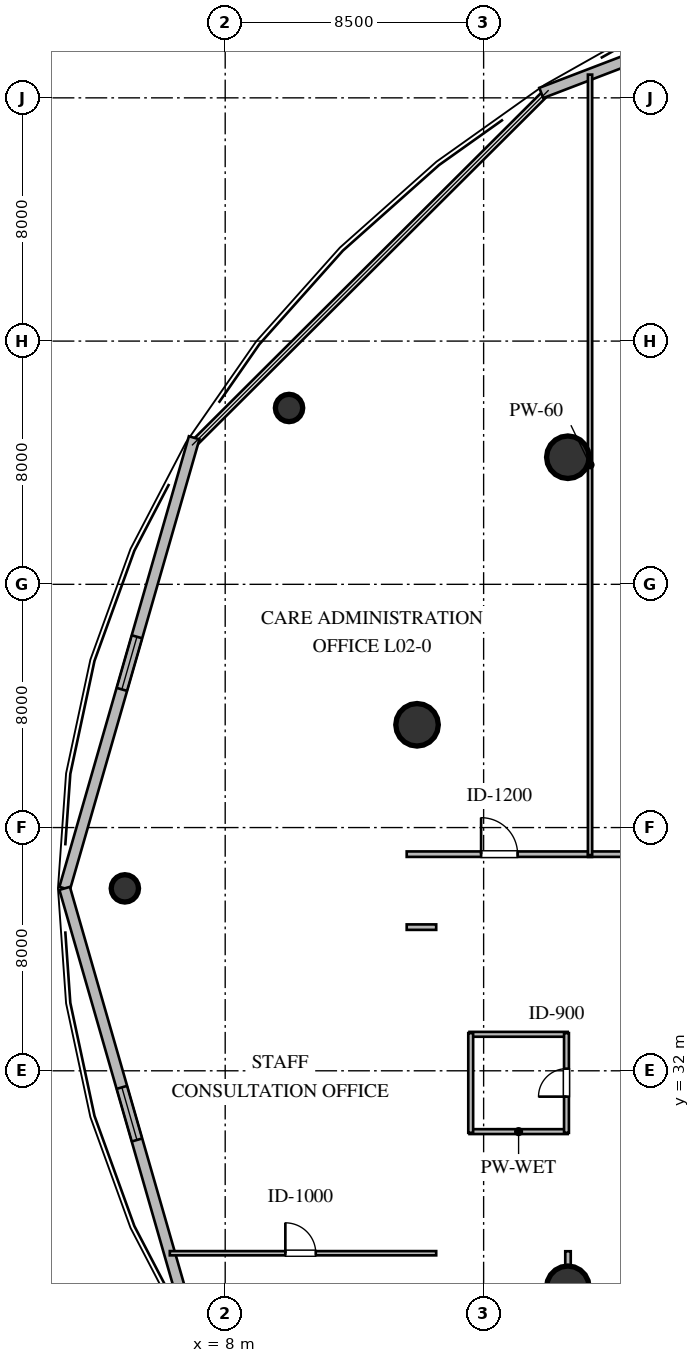
"""IFC4 building model, lengths in metres.
Left out: names, types, materials, properties, quantities, classifications, styles, units other than length and angle.
Written with IfcOpenShell. Run it as: python <this file> out.ifc"""

import sys

from ifc_helpers import new_model, si_unit, direction, frame, frame_2d, origin, origin_2d, place, context, subcontext, project, spatial, rectangle, circle, extrude, element, fill, save


model = new_model("IFC4")
c1 = context("Model", 3, precision=1e-05, world=origin(), true_north=direction((0.0, 1.0)))
c2 = subcontext(c1, "Body", "Model", "MODEL_VIEW")
j1 = project(units=[si_unit("LENGTHUNIT", "METRE"), si_unit("PLANEANGLEUNIT", "RADIAN")], contexts=[c1])
p1 = place(None, origin())
s1 = spatial("IfcSite", under=j1, at=p1, CompositionType="ELEMENT")
p2 = place(p1, origin())
s2 = spatial("IfcBuilding", under=s1, at=p2, CompositionType="ELEMENT")
p3 = place(p2, frame((0.0, 0.0, 9.6)))
s3 = spatial("IfcBuildingStorey", under=s2, at=p3, CompositionType="ELEMENT", Elevation=9.6)
for number, where, z_axis, x_axis in (
    (1, (19.27, 52.18, 0.0), (0.0, 0.0, 1.0), (1.0, 0.0, 0.0)),
    (2, (14.31, 43.38, 0.0), (0.0, 0.0, 1.0), (1.0, 0.0, 0.0)),
    (3, (19.27, 24.88, 0.0), (0.0, 0.0, 1.0), (1.0, 0.0, 0.0)),
):
    element("IfcColumn", number, at=place(p3, frame(where, z_axis=z_axis, x_axis=x_axis)), inside=s3, PredefinedType="COLUMN", context=c2, shape_type="SweptSolid", body=[
        extrude(circle(Radius=0.7, at=origin_2d()), origin(), (0.0, 0.0, 1.0), 4.8),
    ])
for number, where, z_axis, x_axis in (
    (4, (10.1, 53.8, 0.0), (0.0, 0.0, 1.0), (1.0, 0.0, 0.0)),
    (5, (4.7, 38.0, 0.0), (0.0, 0.0, 1.0), (1.0, 0.0, 0.0)),
):
    element("IfcColumn", number, at=place(p3, frame(where, z_axis=z_axis, x_axis=x_axis)), inside=s3, PredefinedType="COLUMN", context=c2, shape_type="SweptSolid", body=[
        extrude(circle(Radius=0.45, at=origin_2d()), origin(), (0.0, 0.0, 1.0), 4.8),
    ])
p4 = place(p3, frame((35.835, 70.831, 0.0), z_axis=(0.0, 0.0, 1.0), x_axis=(-0.934010262022, -0.357246176238, 0.0)))
e6 = element("IfcWall", 6, at=p4, inside=s3, PredefinedType="STANDARD", context=c2, shape_type="SweptSolid", body=[
    extrude(rectangle(XDim=18.671, YDim=0.36, at=frame_2d((9.335, 0.0))), origin(), (0.0, 0.0, 1.0), 4.52),
])
p5 = place(p4, frame((8.436, 0.0, 1.05)))
e7 = element("IfcOpeningElement", 7, at=p5, cuts=e6, PredefinedType="OPENING", context=c2, shape_type="SweptSolid", body=[
    extrude(rectangle(XDim=1.8, YDim=1.7, at=frame_2d((0.9, 0.85))), frame((0.0, 0.19, 0.0), z_axis=(0.0, -1.0, 0.0), x_axis=(1.0, 0.0, 0.0)), (0.0, 0.0, 1.0), 0.38),
])
p6 = place(p3, frame((6.979, 52.82, 0.0), z_axis=(0.0, 0.0, 1.0), x_axis=(-0.276203409751, -0.961099202186, 0.0)))
e8 = element("IfcWall", 8, at=p6, inside=s3, PredefinedType="STANDARD", context=c2, shape_type="SweptSolid", body=[
    extrude(rectangle(XDim=15.42, YDim=0.36, at=frame_2d((7.71, 0.0))), origin(), (0.0, 0.0, 1.0), 4.52),
])
p7 = place(p6, frame((6.81, 0.0, 1.05)))
e9 = element("IfcOpeningElement", 9, at=p7, cuts=e8, PredefinedType="OPENING", context=c2, shape_type="SweptSolid", body=[
    extrude(rectangle(XDim=1.8, YDim=1.7, at=frame_2d((0.9, 0.85))), frame((0.0, 0.19, 0.0), z_axis=(0.0, -1.0, 0.0), x_axis=(1.0, 0.0, 0.0)), (0.0, 0.0, 1.0), 0.38),
])
p8 = place(p3, frame((2.72, 38.0, 0.0), z_axis=(0.0, 0.0, 1.0), x_axis=(0.276203409751, -0.961099202186, 0.0)))
e10 = element("IfcWall", 10, at=p8, inside=s3, PredefinedType="STANDARD", context=c2, shape_type="SweptSolid", body=[
    extrude(rectangle(XDim=15.42, YDim=0.36, at=frame_2d((7.71, 0.0))), origin(), (0.0, 0.0, 1.0), 4.52),
])
p9 = place(p8, frame((6.81, 0.0, 1.05)))
e11 = element("IfcOpeningElement", 11, at=p9, cuts=e10, PredefinedType="OPENING", context=c2, shape_type="SweptSolid", body=[
    extrude(rectangle(XDim=1.8, YDim=1.7, at=frame_2d((0.9, 0.85))), frame((0.0, 0.19, 0.0), z_axis=(0.0, -1.0, 0.0), x_axis=(1.0, 0.0, 0.0)), (0.0, 0.0, 1.0), 0.38),
])
for number, where, z_axis, x_axis in (
    (12, (16.035, 30.0, 0.0), (0.0, 0.0, 1.0), (1.0, 0.0, 0.0)),
    (13, (16.035, 33.2, 0.0), (0.0, 0.0, 1.0), (1.0, 0.0, 0.0)),
):
    element("IfcWall", number, at=place(p3, frame(where, z_axis=z_axis, x_axis=x_axis)), inside=s3, PredefinedType="PLUMBINGWALL", context=c2, shape_type="SweptSolid", body=[
        extrude(rectangle(XDim=3.23, YDim=0.16, at=frame_2d((1.615, 0.0))), origin(), (0.0, 0.0, 1.0), 4.52),
    ])
p10 = place(p3, frame((16.075, 29.96, 0.0), z_axis=(0.0, 0.0, 1.0), x_axis=(0.0, 1.0, 0.0)))
e14 = element("IfcWall", 14, at=p10, inside=s3, PredefinedType="PLUMBINGWALL", context=c2, shape_type="SweptSolid", body=[
    extrude(rectangle(XDim=3.28, YDim=0.16, at=frame_2d((1.64, 0.0))), origin(), (0.0, 0.0, 1.0), 4.52),
])
p11 = place(p3, frame((19.225, 29.96, 0.0), z_axis=(0.0, 0.0, 1.0), x_axis=(0.0, 1.0, 0.0)))
e15 = element("IfcWall", 15, at=p11, inside=s3, PredefinedType="PLUMBINGWALL", context=c2, shape_type="SweptSolid", body=[
    extrude(rectangle(XDim=3.28, YDim=0.16, at=frame_2d((1.64, 0.0))), origin(), (0.0, 0.0, 1.0), 4.52),
])
p12 = place(p11, frame((1.19, 0.0, 0.0)))
e16 = element("IfcOpeningElement", 16, at=p12, cuts=e15, PredefinedType="OPENING", context=c2, shape_type="SweptSolid", body=[
    extrude(rectangle(XDim=0.92, YDim=2.1, at=frame_2d((0.46, 1.05))), frame((0.0, 0.09, 0.0), z_axis=(0.0, -1.0, 0.0), x_axis=(1.0, 0.0, 0.0)), (0.0, 0.0, 1.0), 0.18),
])
p13 = place(p3, frame((13.97, 39.125, 0.0), z_axis=(0.0, 0.0, 1.0), x_axis=(1.0, 0.0, 0.0)))
e17 = element("IfcWall", 17, at=p13, inside=s3, PredefinedType="PARTITIONING", context=c2, shape_type="SweptSolid", body=[
    extrude(rectangle(XDim=6.095, YDim=0.18, at=frame_2d((3.047, 0.0))), origin(), (0.0, 0.0, 1.0), 4.52),
])
p14 = place(p13, frame((2.447, 0.0, 0.0)))
e18 = element("IfcOpeningElement", 18, at=p14, cuts=e17, PredefinedType="OPENING", context=c2, shape_type="SweptSolid", body=[
    extrude(rectangle(XDim=1.2, YDim=2.15, at=frame_2d((0.6, 1.075))), frame((0.0, 0.1, 0.0), z_axis=(0.0, -1.0, 0.0), x_axis=(1.0, 0.0, 0.0)), (0.0, 0.0, 1.0), 0.2),
])
p15 = place(p3, frame((19.935, 39.125, 0.0), z_axis=(0.0, 0.0, 1.0), x_axis=(1.0, 0.0, 0.0)))
e19 = element("IfcWall", 19, at=p15, inside=s3, PredefinedType="PARTITIONING", context=c2, shape_type="SweptSolid", body=[
    extrude(rectangle(XDim=12.53, YDim=0.18, at=frame_2d((6.265, 0.0))), origin(), (0.0, 0.0, 1.0), 4.52),
])
p16 = place(p15, frame((5.665, 0.0, 0.0)))
e20 = element("IfcOpeningElement", 20, at=p16, cuts=e19, PredefinedType="OPENING", context=c2, shape_type="SweptSolid", body=[
    extrude(rectangle(XDim=1.2, YDim=2.15, at=frame_2d((0.6, 1.075))), frame((0.0, 0.1, 0.0), z_axis=(0.0, -1.0, 0.0), x_axis=(1.0, 0.0, 0.0)), (0.0, 0.0, 1.0), 0.2),
])
p17 = place(p3, frame((19.275, 19.97, 0.0), z_axis=(0.0, 0.0, 1.0), x_axis=(0.0, 1.0, 0.0)))
e21 = element("IfcWall", 21, at=p17, inside=s3, PredefinedType="PARTITIONING", context=c2, shape_type="SweptSolid", body=[
    extrude(rectangle(XDim=6.095, YDim=0.18, at=frame_2d((3.047, 0.0))), origin(), (0.0, 0.0, 1.0), 3.898),
])
p18 = place(p17, frame((1.647, 0.0, 0.0)))
e22 = element("IfcOpeningElement", 22, at=p18, cuts=e21, PredefinedType="OPENING", context=c2, shape_type="SweptSolid", body=[
    extrude(rectangle(XDim=1.2, YDim=2.15, at=frame_2d((0.6, 1.075))), frame((0.0, 0.1, 0.0), z_axis=(0.0, -1.0, 0.0), x_axis=(1.0, 0.0, 0.0)), (0.0, 0.0, 1.0), 0.2),
])
p19 = place(p3, frame((14.94, 36.725, 0.0), z_axis=(0.0, 0.0, 1.0), x_axis=(-1.0, 0.0, 0.0)))
e23 = element("IfcWall", 23, at=p19, inside=s3, PredefinedType="PARTITIONING", context=c2, shape_type="SweptSolid", body=[
    extrude(rectangle(XDim=0.97, YDim=0.18, at=frame_2d((0.485, 0.0))), origin(), (0.0, 0.0, 1.0), 4.52),
])
p20 = place(p3, frame((20.0, 64.764, 0.0), z_axis=(0.0, 0.0, 1.0), x_axis=(0.0, -1.0, 0.0)))
e24 = element("IfcWall", 24, at=p20, inside=s3, PredefinedType="PARTITIONING", context=c2, shape_type="SweptSolid", body=[
    extrude(rectangle(XDim=25.669, YDim=0.14, at=frame_2d((12.835, 0.0))), origin(), (0.0, 0.0, 1.0), 3.966),
])
p21 = place(p3, frame((6.179, 26.0, 0.0), z_axis=(0.0, 0.0, 1.0), x_axis=(1.0, 0.0, 0.0)))
e25 = element("IfcWall", 25, at=p21, inside=s3, PredefinedType="PARTITIONING", context=c2, shape_type="SweptSolid", body=[
    extrude(rectangle(XDim=8.761, YDim=0.14, at=frame_2d((4.381, 0.0))), origin(), (0.0, 0.0, 1.0), 4.52),
])
p22 = place(p21, frame((3.8, 0.0, 0.0)))
e26 = element("IfcOpeningElement", 26, at=p22, cuts=e25, PredefinedType="OPENING", context=c2, shape_type="SweptSolid", body=[
    extrude(rectangle(XDim=1.0, YDim=2.1, at=frame_2d((0.5, 1.05))), frame((0.0, 0.08, 0.0), z_axis=(0.0, -1.0, 0.0), x_axis=(1.0, 0.0, 0.0)), (0.0, 0.0, 1.0), 0.16),
])
p23 = place(p7, origin())
e27 = element("IfcWindow", 27, at=p23, inside=s3, PartitioningType="SINGLE_PANEL", PredefinedType="WINDOW", context=c2, shape_type="SweptSolid", body=[
    extrude(rectangle(XDim=1.8, YDim=1.7, at=frame_2d((0.9, 0.85))), frame((0.0, 0.03, 0.0), z_axis=(0.0, -1.0, 0.0), x_axis=(1.0, 0.0, 0.0)), (0.0, 0.0, 1.0), 0.06),
])
fill(e9, e27)
p24 = place(p9, origin())
e28 = element("IfcWindow", 28, at=p24, inside=s3, PartitioningType="SINGLE_PANEL", PredefinedType="WINDOW", context=c2, shape_type="SweptSolid", body=[
    extrude(rectangle(XDim=1.8, YDim=1.7, at=frame_2d((0.9, 0.85))), frame((0.0, 0.03, 0.0), z_axis=(0.0, -1.0, 0.0), x_axis=(1.0, 0.0, 0.0)), (0.0, 0.0, 1.0), 0.06),
])
fill(e11, e28)
p25 = place(p12, origin())
e29 = element("IfcDoor", 29, at=p25, inside=s3, OperationType="SINGLE_SWING_LEFT", PredefinedType="DOOR", context=c2, shape_type="SweptSolid", body=[
    extrude(rectangle(XDim=0.92, YDim=2.1, at=frame_2d((0.46, 1.05))), frame((0.0, 0.025, 0.0), z_axis=(0.0, -1.0, 0.0), x_axis=(1.0, 0.0, 0.0)), (0.0, 0.0, 1.0), 0.05),
])
fill(e16, e29)
p26 = place(p14, origin())
e30 = element("IfcDoor", 30, at=p26, inside=s3, OperationType="SINGLE_SWING_LEFT", PredefinedType="DOOR", context=c2, shape_type="SweptSolid", body=[
    extrude(rectangle(XDim=1.2, YDim=2.15, at=frame_2d((0.6, 1.075))), frame((0.0, 0.025, 0.0), z_axis=(0.0, -1.0, 0.0), x_axis=(1.0, 0.0, 0.0)), (0.0, 0.0, 1.0), 0.05),
])
fill(e18, e30)
p27 = place(p22, origin())
e31 = element("IfcDoor", 31, at=p27, inside=s3, OperationType="SINGLE_SWING_LEFT", PredefinedType="DOOR", context=c2, shape_type="SweptSolid", body=[
    extrude(rectangle(XDim=1.0, YDim=2.1, at=frame_2d((0.5, 1.05))), frame((0.0, 0.025, 0.0), z_axis=(0.0, -1.0, 0.0), x_axis=(1.0, 0.0, 0.0)), (0.0, 0.0, 1.0), 0.05),
])
fill(e26, e31)
save(model, sys.argv[1])
